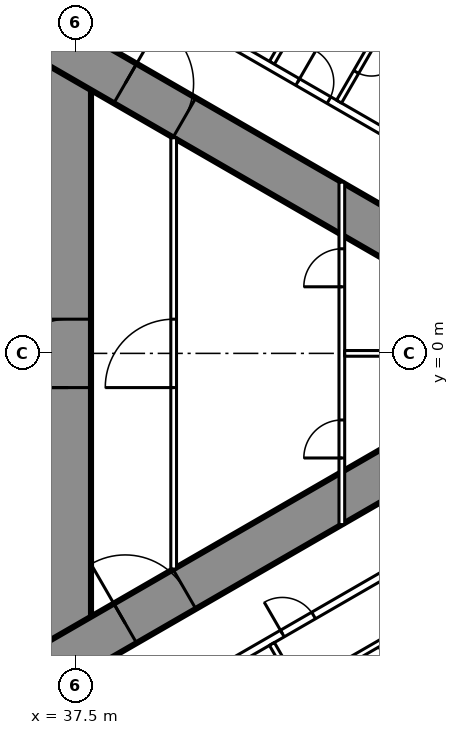
"""IFC4 building model, lengths in metres.
Left out: names, types, materials, properties, quantities, classifications, styles, units other than length and angle.
Written with IfcOpenShell. Run it as: python <this file> out.ifc"""

import sys

from ifc_helpers import new_model, si_unit, direction, frame, frame_2d, origin, place, context, subcontext, project, spatial, rectangle, extrude, element, fill, save


model = new_model("IFC4")
c1 = context("Model", 3, precision=1e-05, world=origin(), true_north=direction((0.0, 1.0)))
c2 = subcontext(c1, "Body", "Model", "MODEL_VIEW")
j1 = project(units=[si_unit("LENGTHUNIT", "METRE"), si_unit("PLANEANGLEUNIT", "RADIAN")], contexts=[c1])
p1 = place(None, origin())
s1 = spatial("IfcSite", under=j1, at=p1, CompositionType="ELEMENT")
p2 = place(p1, origin())
s2 = spatial("IfcBuilding", under=s1, at=p2, CompositionType="ELEMENT")
p3 = place(p2, frame((0.0, 0.0, 215.3)))
s3 = spatial("IfcBuildingStorey", under=s2, at=p3, CompositionType="ELEMENT", Elevation=215.3)
p4 = place(p3, frame((37.3, -8.6, 0.0), z_axis=(0.0, 0.0, 1.0), x_axis=(0.0, 1.0, 0.0)))
e1 = element("IfcWall", 1, at=p4, inside=s3, PredefinedType="SHEAR", context=c2, shape_type="SweptSolid", body=[
    extrude(rectangle(XDim=17.2, YDim=1.2, at=frame_2d((8.6, 0.0))), origin(), (0.0, 0.0, 1.0), 3.6),
])
p5 = place(p4, frame((7.7, 0.0, 0.0)))
e2 = element("IfcOpeningElement", 2, at=p5, cuts=e1, PredefinedType="OPENING", context=c2, shape_type="SweptSolid", body=[
    extrude(rectangle(XDim=1.8, YDim=2.2, at=frame_2d((0.9, 1.1))), frame((0.0, 0.61, 0.0), z_axis=(0.0, -1.0, 0.0), x_axis=(1.0, 0.0, 0.0)), (0.0, 0.0, 1.0), 1.22),
])
p6 = place(p3, frame((27.2, -13.8, 0.0), z_axis=(0.0, 0.0, 1.0), x_axis=(0.866027159892, 0.499996958321, 0.0)))
e3 = element("IfcWall", 3, at=p6, inside=s3, PredefinedType="SHEAR", context=c2, shape_type="SweptSolid", body=[
    extrude(rectangle(XDim=27.947, YDim=1.2, at=frame_2d((13.973, 0.0))), origin(), (0.0, 0.0, 1.0), 3.6),
])
p7 = place(p6, frame((4.6, 0.0, 0.0)))
e4 = element("IfcOpeningElement", 4, at=p7, cuts=e3, PredefinedType="OPENING", context=c2, shape_type="SweptSolid", body=[
    extrude(rectangle(XDim=1.0, YDim=2.2, at=frame_2d((0.5, 1.1))), frame((0.0, 0.61, 0.0), z_axis=(0.0, -1.0, 0.0), x_axis=(1.0, 0.0, 0.0)), (0.0, 0.0, 1.0), 1.22),
])
p8 = place(p6, frame((13.395, 0.0, 0.0)))
e5 = element("IfcOpeningElement", 5, at=p8, cuts=e3, PredefinedType="OPENING", context=c2, shape_type="SweptSolid", body=[
    extrude(rectangle(XDim=1.8, YDim=2.2, at=frame_2d((0.9, 1.1))), frame((0.0, 0.61, 0.0), z_axis=(0.0, -1.0, 0.0), x_axis=(1.0, 0.0, 0.0)), (0.0, 0.0, 1.0), 1.22),
])
p9 = place(p3, frame((27.2, 13.8, 0.0), z_axis=(0.0, 0.0, 1.0), x_axis=(0.866024515034, -0.500001539357, 0.0)))
e6 = element("IfcWall", 6, at=p9, inside=s3, PredefinedType="SHEAR", context=c2, shape_type="SweptSolid", body=[
    extrude(rectangle(XDim=26.907, YDim=1.2, at=frame_2d((13.454, 0.0))), origin(), (0.0, 0.0, 1.0), 3.6),
])
p10 = place(p9, frame((4.6, 0.0, 0.0)))
e7 = element("IfcOpeningElement", 7, at=p10, cuts=e6, PredefinedType="OPENING", context=c2, shape_type="SweptSolid", body=[
    extrude(rectangle(XDim=1.0, YDim=2.2, at=frame_2d((0.5, 1.1))), frame((0.0, 0.61, 0.0), z_axis=(0.0, -1.0, 0.0), x_axis=(1.0, 0.0, 0.0)), (0.0, 0.0, 1.0), 1.22),
])
p11 = place(p9, frame((13.395, 0.0, 0.0)))
e8 = element("IfcOpeningElement", 8, at=p11, cuts=e6, PredefinedType="OPENING", context=c2, shape_type="SweptSolid", body=[
    extrude(rectangle(XDim=1.8, YDim=2.2, at=frame_2d((0.9, 1.1))), frame((0.0, 0.61, 0.0), z_axis=(0.0, -1.0, 0.0), x_axis=(1.0, 0.0, 0.0)), (0.0, 0.0, 1.0), 1.22),
])
p12 = place(p3, frame((28.959, -15.44, 0.0), z_axis=(0.0, 0.0, 1.0), x_axis=(0.866025227435, 0.500000305447, 0.0)))
e9 = element("IfcWall", 9, at=p12, inside=s3, PredefinedType="PARTITIONING", context=c2, shape_type="SweptSolid", body=[
    extrude(rectangle(XDim=30.88, YDim=0.2, at=frame_2d((15.44, 0.0))), origin(), (0.0, 0.0, 1.0), 3.35),
])
p13 = place(p12, frame((0.494, 0.0, 0.0)))
e10 = element("IfcOpeningElement", 10, at=p13, cuts=e9, PredefinedType="OPENING", context=c2, shape_type="SweptSolid", body=[
    extrude(rectangle(XDim=1.8, YDim=2.2, at=frame_2d((0.9, 1.1))), frame((0.0, 0.11, 0.0), z_axis=(0.0, -1.0, 0.0), x_axis=(1.0, 0.0, 0.0)), (0.0, 0.0, 1.0), 0.22),
])
p14 = place(p12, frame((7.687, 0.0, 0.0)))
e11 = element("IfcOpeningElement", 11, at=p14, cuts=e9, PredefinedType="OPENING", context=c2, shape_type="SweptSolid", body=[
    extrude(rectangle(XDim=1.0, YDim=2.2, at=frame_2d((0.5, 1.1))), frame((0.0, 0.11, 0.0), z_axis=(0.0, -1.0, 0.0), x_axis=(1.0, 0.0, 0.0)), (0.0, 0.0, 1.0), 0.22),
])
p15 = place(p12, frame((16.137, 0.0, 0.0)))
e12 = element("IfcOpeningElement", 12, at=p15, cuts=e9, PredefinedType="OPENING", context=c2, shape_type="SweptSolid", body=[
    extrude(rectangle(XDim=0.95, YDim=2.2, at=frame_2d((0.475, 1.1))), frame((0.0, 0.11, 0.0), z_axis=(0.0, -1.0, 0.0), x_axis=(1.0, 0.0, 0.0)), (0.0, 0.0, 1.0), 0.22),
])
p16 = place(p12, frame((20.021, 0.0, 0.0)))
e13 = element("IfcOpeningElement", 13, at=p16, cuts=e9, PredefinedType="OPENING", context=c2, shape_type="SweptSolid", body=[
    extrude(rectangle(XDim=0.95, YDim=2.2, at=frame_2d((0.475, 1.1))), frame((0.0, 0.11, 0.0), z_axis=(0.0, -1.0, 0.0), x_axis=(1.0, 0.0, 0.0)), (0.0, 0.0, 1.0), 0.22),
])
p17 = place(p12, frame((26.253, 0.0, 0.0)))
e14 = element("IfcOpeningElement", 14, at=p17, cuts=e9, PredefinedType="OPENING", context=c2, shape_type="SweptSolid", body=[
    extrude(rectangle(XDim=0.95, YDim=2.2, at=frame_2d((0.475, 1.1))), frame((0.0, 0.11, 0.0), z_axis=(0.0, -1.0, 0.0), x_axis=(1.0, 0.0, 0.0)), (0.0, 0.0, 1.0), 0.22),
])
for number, where, z_axis, x_axis in (
    (15, (42.66, -7.646, 0.0), (0.0, 0.0, 1.0), (0.5, -0.866, 0.0)),
    (16, (42.66, 7.646, 0.0), (0.0, 0.0, 1.0), (0.5, 0.866, 0.0)),
):
    element("IfcWall", number, at=place(p3, frame(where, z_axis=z_axis, x_axis=x_axis)), inside=s3, PredefinedType="PARTITIONING", context=c2, shape_type="SweptSolid", body=[
        extrude(rectangle(XDim=6.398, YDim=0.15, at=frame_2d((3.199, 0.0))), origin(), (0.0, 0.0, 1.0), 2.45),
    ])
p18 = place(p3, frame((28.959, 15.44, 0.0), z_axis=(0.0, 0.0, 1.0), x_axis=(0.866028936079, -0.499993881836, 0.0)))
e17 = element("IfcWall", 17, at=p18, inside=s3, PredefinedType="PARTITIONING", context=c2, shape_type="SweptSolid", body=[
    extrude(rectangle(XDim=20.503, YDim=0.2, at=frame_2d((10.251, 0.0))), origin(), (0.0, 0.0, 1.0), 3.35),
])
p19 = place(p18, frame((16.603, 0.0, 0.0)))
e18 = element("IfcOpeningElement", 18, at=p19, cuts=e17, PredefinedType="OPENING", context=c2, shape_type="SweptSolid", body=[
    extrude(rectangle(XDim=0.95, YDim=2.2, at=frame_2d((0.475, 1.1))), frame((0.0, 0.11, 0.0), z_axis=(0.0, -1.0, 0.0), x_axis=(1.0, 0.0, 0.0)), (0.0, 0.0, 1.0), 0.22),
])
p20 = place(p18, frame((7.287, 0.0, 0.0)))
e19 = element("IfcOpeningElement", 19, at=p20, cuts=e17, PredefinedType="OPENING", context=c2, shape_type="SweptSolid", body=[
    extrude(rectangle(XDim=0.95, YDim=2.2, at=frame_2d((0.475, 1.1))), frame((0.0, 0.11, 0.0), z_axis=(0.0, -1.0, 0.0), x_axis=(1.0, 0.0, 0.0)), (0.0, 0.0, 1.0), 0.22),
])
p21 = place(p18, frame((2.244, 0.0, 0.0)))
e20 = element("IfcOpeningElement", 20, at=p21, cuts=e17, PredefinedType="OPENING", context=c2, shape_type="SweptSolid", body=[
    extrude(rectangle(XDim=1.8, YDim=2.2, at=frame_2d((0.9, 1.1))), frame((0.0, 0.11, 0.0), z_axis=(0.0, -1.0, 0.0), x_axis=(1.0, 0.0, 0.0)), (0.0, 0.0, 1.0), 0.22),
])
p22 = place(p3, frame((45.503, -7.621, 0.0), z_axis=(0.0, 0.0, 1.0), x_axis=(0.500006934395, -0.866021400173, 0.0)))
e21 = element("IfcWall", 21, at=p22, inside=s3, PredefinedType="PARTITIONING", context=c2, shape_type="SweptSolid", body=[
    extrude(rectangle(XDim=2.6, YDim=0.15, at=frame_2d((1.3, 0.0))), origin(), (0.0, 0.0, 1.0), 3.35),
])
p23 = place(p22, frame((0.9, 0.0, 0.0)))
e22 = element("IfcOpeningElement", 22, at=p23, cuts=e21, PredefinedType="OPENING", context=c2, shape_type="SweptSolid", body=[
    extrude(rectangle(XDim=0.8, YDim=2.2, at=frame_2d((0.4, 1.1))), frame((0.0, 0.085, 0.0), z_axis=(0.0, -1.0, 0.0), x_axis=(1.0, 0.0, 0.0)), (0.0, 0.0, 1.0), 0.17),
])
p24 = place(p3, frame((43.425, -8.821, 0.0), z_axis=(0.0, 0.0, 1.0), x_axis=(0.866006523861, 0.500032699561, 0.0)))
e23 = element("IfcWall", 23, at=p24, inside=s3, PredefinedType="PARTITIONING", context=c2, shape_type="SweptSolid", body=[
    extrude(rectangle(XDim=2.475, YDim=0.15, at=frame_2d((1.237, 0.0))), origin(), (0.0, 0.0, 1.0), 3.35),
])
p25 = place(p3, frame((44.427, 6.625, 0.0), z_axis=(0.0, 0.0, 1.0), x_axis=(0.500006934395, 0.866021400173, 0.0)))
e24 = element("IfcWall", 24, at=p25, inside=s3, PredefinedType="PARTITIONING", context=c2, shape_type="SweptSolid", body=[
    extrude(rectangle(XDim=2.6, YDim=0.15, at=frame_2d((1.3, 0.0))), origin(), (0.0, 0.0, 1.0), 3.35),
])
p26 = place(p25, frame((0.9, 0.0, 0.0)))
e25 = element("IfcOpeningElement", 25, at=p26, cuts=e24, PredefinedType="OPENING", context=c2, shape_type="SweptSolid", body=[
    extrude(rectangle(XDim=0.8, YDim=2.2, at=frame_2d((0.4, 1.1))), frame((0.0, 0.085, 0.0), z_axis=(0.0, -1.0, 0.0), x_axis=(1.0, 0.0, 0.0)), (0.0, 0.0, 1.0), 0.17),
])
p27 = place(p3, frame((40.075, -5.674, 0.0), z_axis=(0.0, 0.0, 1.0), x_axis=(0.0, 1.0, 0.0)))
e26 = element("IfcWall", 26, at=p27, inside=s3, PredefinedType="PARTITIONING", context=c2, shape_type="SweptSolid", body=[
    extrude(rectangle(XDim=11.348, YDim=0.15, at=frame_2d((5.674, 0.0))), origin(), (0.0, 0.0, 1.0), 3.35),
])
p28 = place(p27, frame((4.774, 0.0, 0.0)))
e27 = element("IfcOpeningElement", 27, at=p28, cuts=e26, PredefinedType="OPENING", context=c2, shape_type="SweptSolid", body=[
    extrude(rectangle(XDim=1.8, YDim=2.2, at=frame_2d((0.9, 1.1))), frame((0.0, 0.085, 0.0), z_axis=(0.0, -1.0, 0.0), x_axis=(1.0, 0.0, 0.0)), (0.0, 0.0, 1.0), 0.17),
])
p29 = place(p3, frame((44.5, -4.505, 0.0), z_axis=(0.0, 0.0, 1.0), x_axis=(0.0, 1.0, 0.0)))
e28 = element("IfcWall", 28, at=p29, inside=s3, PredefinedType="PARTITIONING", context=c2, shape_type="SweptSolid", body=[
    extrude(rectangle(XDim=9.009, YDim=0.15, at=frame_2d((4.505, 0.0))), origin(), (0.0, 0.0, 1.0), 3.35),
])
p30 = place(p29, frame((1.752, 0.0, 0.0)))
e29 = element("IfcOpeningElement", 29, at=p30, cuts=e28, PredefinedType="OPENING", context=c2, shape_type="SweptSolid", body=[
    extrude(rectangle(XDim=1.0, YDim=2.2, at=frame_2d((0.5, 1.1))), frame((0.0, 0.085, 0.0), z_axis=(0.0, -1.0, 0.0), x_axis=(1.0, 0.0, 0.0)), (0.0, 0.0, 1.0), 0.17),
])
p31 = place(p29, frame((6.257, 0.0, 0.0)))
e30 = element("IfcOpeningElement", 30, at=p31, cuts=e28, PredefinedType="OPENING", context=c2, shape_type="SweptSolid", body=[
    extrude(rectangle(XDim=1.0, YDim=2.2, at=frame_2d((0.5, 1.1))), frame((0.0, 0.085, 0.0), z_axis=(0.0, -1.0, 0.0), x_axis=(1.0, 0.0, 0.0)), (0.0, 0.0, 1.0), 0.17),
])
p32 = place(p3, frame((44.575, 0.0, 0.0), z_axis=(0.0, 0.0, 1.0), x_axis=(1.0, 0.0, 0.0)))
e31 = element("IfcWall", 31, at=p32, inside=s3, PredefinedType="PARTITIONING", context=c2, shape_type="SweptSolid", body=[
    extrude(rectangle(XDim=7.727, YDim=0.15, at=frame_2d((3.864, 0.0))), origin(), (0.0, 0.0, 1.0), 2.45),
])
p33 = place(p15, origin())
e32 = element("IfcDoor", 32, at=p33, inside=s3, OperationType="SINGLE_SWING_LEFT", PredefinedType="DOOR", context=c2, shape_type="SweptSolid", body=[
    extrude(rectangle(XDim=0.95, YDim=2.2, at=frame_2d((0.475, 1.1))), frame((0.0, 0.025, 0.0), z_axis=(0.0, -1.0, 0.0), x_axis=(1.0, 0.0, 0.0)), (0.0, 0.0, 1.0), 0.05),
])
fill(e12, e32)
p34 = place(p26, origin())
e33 = element("IfcDoor", 33, at=p34, inside=s3, OperationType="SINGLE_SWING_RIGHT", PredefinedType="DOOR", context=c2, shape_type="SweptSolid", body=[
    extrude(rectangle(XDim=0.8, YDim=2.2, at=frame_2d((0.4, 1.1))), frame((0.0, 0.025, 0.0), z_axis=(0.0, -1.0, 0.0), x_axis=(1.0, 0.0, 0.0)), (0.0, 0.0, 1.0), 0.05),
])
fill(e25, e33)
p35 = place(p19, origin())
e34 = element("IfcDoor", 34, at=p35, inside=s3, OperationType="SINGLE_SWING_LEFT", PredefinedType="DOOR", context=c2, shape_type="SweptSolid", body=[
    extrude(rectangle(XDim=0.95, YDim=2.2, at=frame_2d((0.475, 1.1))), frame((0.0, 0.025, 0.0), z_axis=(0.0, -1.0, 0.0), x_axis=(1.0, 0.0, 0.0)), (0.0, 0.0, 1.0), 0.05),
])
fill(e18, e34)
p36 = place(p28, origin())
e35 = element("IfcDoor", 35, at=p36, inside=s3, OperationType="DOUBLE_DOOR_SINGLE_SWING", PredefinedType="DOOR", context=c2, shape_type="SweptSolid", body=[
    extrude(rectangle(XDim=1.8, YDim=2.2, at=frame_2d((0.9, 1.1))), frame((0.0, 0.025, 0.0), z_axis=(0.0, -1.0, 0.0), x_axis=(1.0, 0.0, 0.0)), (0.0, 0.0, 1.0), 0.05),
])
fill(e27, e35)
p37 = place(p30, origin())
e36 = element("IfcDoor", 36, at=p37, inside=s3, OperationType="SINGLE_SWING_LEFT", PredefinedType="DOOR", context=c2, shape_type="SweptSolid", body=[
    extrude(rectangle(XDim=1.0, YDim=2.2, at=frame_2d((0.5, 1.1))), frame((0.0, 0.025, 0.0), z_axis=(0.0, -1.0, 0.0), x_axis=(1.0, 0.0, 0.0)), (0.0, 0.0, 1.0), 0.05),
])
fill(e29, e36)
p38 = place(p31, origin())
e37 = element("IfcDoor", 37, at=p38, inside=s3, OperationType="SINGLE_SWING_LEFT", PredefinedType="DOOR", context=c2, shape_type="SweptSolid", body=[
    extrude(rectangle(XDim=1.0, YDim=2.2, at=frame_2d((0.5, 1.1))), frame((0.0, 0.025, 0.0), z_axis=(0.0, -1.0, 0.0), x_axis=(1.0, 0.0, 0.0)), (0.0, 0.0, 1.0), 0.05),
])
fill(e30, e37)
p39 = place(p8, origin())
e38 = element("IfcDoor", 38, at=p39, inside=s3, OperationType="DOUBLE_DOOR_SINGLE_SWING", PredefinedType="DOOR", context=c2, shape_type="SweptSolid", body=[
    extrude(rectangle(XDim=1.8, YDim=2.2, at=frame_2d((0.9, 1.1))), frame((0.0, 0.025, 0.0), z_axis=(0.0, -1.0, 0.0), x_axis=(1.0, 0.0, 0.0)), (0.0, 0.0, 1.0), 0.05),
])
fill(e5, e38)
p40 = place(p11, origin())
e39 = element("IfcDoor", 39, at=p40, inside=s3, OperationType="DOUBLE_DOOR_SINGLE_SWING", PredefinedType="DOOR", context=c2, shape_type="SweptSolid", body=[
    extrude(rectangle(XDim=1.8, YDim=2.2, at=frame_2d((0.9, 1.1))), frame((0.0, 0.025, 0.0), z_axis=(0.0, -1.0, 0.0), x_axis=(1.0, 0.0, 0.0)), (0.0, 0.0, 1.0), 0.05),
])
fill(e8, e39)
p41 = place(p5, origin())
e40 = element("IfcDoor", 40, at=p41, inside=s3, OperationType="DOUBLE_DOOR_SINGLE_SWING", PredefinedType="DOOR", context=c2, shape_type="SweptSolid", body=[
    extrude(rectangle(XDim=1.8, YDim=2.2, at=frame_2d((0.9, 1.1))), frame((0.0, 0.025, 0.0), z_axis=(0.0, -1.0, 0.0), x_axis=(1.0, 0.0, 0.0)), (0.0, 0.0, 1.0), 0.05),
])
fill(e2, e40)
save(model, sys.argv[1])
